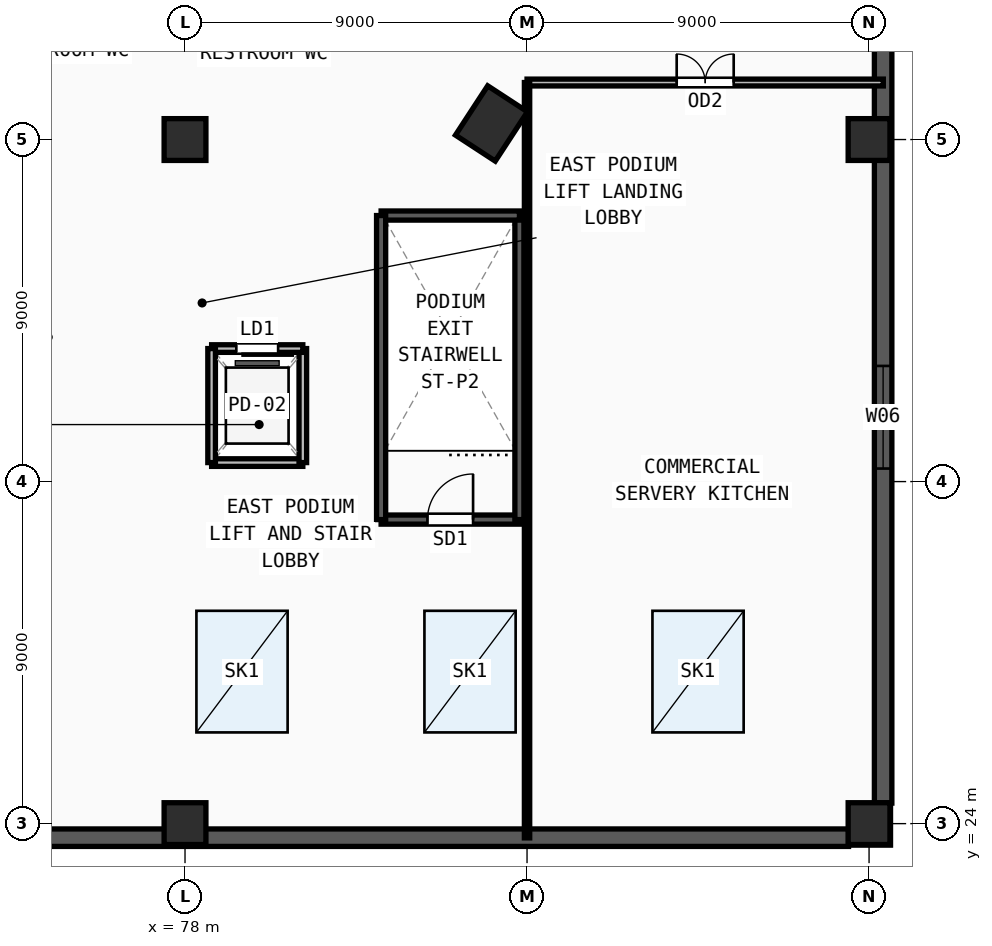
"""IFC4 building model, lengths in metres.
Left out: names, types, materials, properties, quantities, classifications, styles, units other than length and angle.
Written with IfcOpenShell. Run it as: python <this file> out.ifc"""

import sys

from ifc_helpers import new_model, si_unit, direction, frame, frame_2d, origin, origin_2d, place, context, subcontext, project, spatial, rectangle, extrude, source, transform, mapped, element, fill, save


model = new_model("IFC4")
c1 = context("Model", 3, precision=1e-05, world=origin(), true_north=direction((0.0, 1.0)))
c2 = subcontext(c1, "Body", "Model", "MODEL_VIEW")
j1 = project(units=[si_unit("LENGTHUNIT", "METRE"), si_unit("PLANEANGLEUNIT", "RADIAN")], contexts=[c1])
p1 = place(None, origin())
s1 = spatial("IfcSite", under=j1, at=p1, CompositionType="ELEMENT")
p2 = place(p1, origin())
s2 = spatial("IfcBuilding", under=s1, at=p2, CompositionType="ELEMENT")
p3 = place(p2, frame((0.0, 0.0, 23.4)))
s3 = spatial("IfcBuildingStorey", under=s2, at=p3, CompositionType="ELEMENT", Elevation=23.4)
m1 = source(origin(), c2, "Body", "SweptSolid", [
    extrude(rectangle(XDim=1.55, YDim=1.25, at=origin_2d()), origin(), (0.0, 0.0, 1.0), 5.1),
])
p4 = place(p3, frame((86.064, 42.423, 0.0), z_axis=(0.0, 0.0, 1.0), x_axis=(0.546978918409, 0.837146380758, 0.0)))
e1 = element("IfcColumn", 1, at=p4, inside=s3, PredefinedType="COLUMN", context=c2, shape_type="MappedRepresentation", body=[
    mapped(m1, transform((0.0, 0.0, 0.0), x_axis=(1.0, 0.0, 0.0), y_axis=(0.0, 1.0, 0.0), z_axis=(0.0, 0.0, 1.0), scale=1.0)),
])
m2 = source(origin(), c2, "Body", "SweptSolid", [
    extrude(rectangle(XDim=1.1, YDim=1.1, at=origin_2d()), origin(), (0.0, 0.0, 1.0), 5.1),
])
for number, where, z_axis, x_axis in (
    (2, (78.0, 24.0, 0.0), (0.0, 0.0, 1.0), (1.0, 0.0, 0.0)),
    (3, (96.0, 24.0, 0.0), (0.0, 0.0, 1.0), (1.0, 0.0, 0.0)),
    (4, (78.0, 42.0, 0.0), (0.0, 0.0, 1.0), (1.0, 0.0, 0.0)),
    (5, (96.0, 42.0, 0.0), (0.0, 0.0, 1.0), (1.0, 0.0, 0.0)),
):
    element("IfcColumn", number, at=place(p3, frame(where, z_axis=z_axis, x_axis=x_axis)), inside=s3, PredefinedType="COLUMN", context=c2, shape_type="MappedRepresentation", body=[
        mapped(m2, transform((0.0, 0.0, 0.0), x_axis=(1.0, 0.0, 0.0), y_axis=(0.0, 1.0, 0.0), z_axis=(0.0, 0.0, 1.0), scale=1.0)),
    ])
p5 = place(p3, frame((96.37, 24.54, 0.0), z_axis=(0.0, 0.0, 1.0), x_axis=(0.0, 1.0, 0.0)))
e6 = element("IfcWall", 6, at=p5, inside=s3, PredefinedType="SOLIDWALL", context=c2, shape_type="SweptSolid", body=[
    extrude(rectangle(XDim=60.92, YDim=0.46, at=frame_2d((30.46, 0.0))), origin(), (0.0, 0.0, 1.0), 4.82),
])
m3 = source(origin(), c2, "Body", "SweptSolid", [
    extrude(rectangle(XDim=2.7, YDim=2.35, at=frame_2d((1.35, 1.175))), frame((0.0, 0.24, 0.0), z_axis=(0.0, -1.0, 0.0), x_axis=(1.0, 0.0, 0.0)), (0.0, 0.0, 1.0), 0.48),
])
p6 = place(p5, frame((8.803, 0.0, 0.55)))
e7 = element("IfcOpeningElement", 7, at=p6, cuts=e6, PredefinedType="OPENING", context=c2, shape_type="MappedRepresentation", body=[
    mapped(m3, transform((0.0, 0.0, 0.0), x_axis=(1.0, 0.0, 0.0), y_axis=(0.0, 1.0, 0.0), z_axis=(0.0, 0.0, 1.0), scale=1.0)),
])
p7 = place(p5, frame((29.11, 0.0, 0.55)))
e8 = element("IfcOpeningElement", 8, at=p7, cuts=e6, PredefinedType="OPENING", context=c2, shape_type="MappedRepresentation", body=[
    mapped(m3, transform((0.0, 0.0, 0.0), x_axis=(1.0, 0.0, 0.0), y_axis=(0.0, 1.0, 0.0), z_axis=(0.0, 0.0, 1.0), scale=1.0)),
])
p8 = place(p5, frame((39.263, 0.0, 0.55)))
e9 = element("IfcOpeningElement", 9, at=p8, cuts=e6, PredefinedType="OPENING", context=c2, shape_type="MappedRepresentation", body=[
    mapped(m3, transform((0.0, 0.0, 0.0), x_axis=(1.0, 0.0, 0.0), y_axis=(0.0, 1.0, 0.0), z_axis=(0.0, 0.0, 1.0), scale=1.0)),
])
p9 = place(p5, frame((49.417, 0.0, 0.55)))
e10 = element("IfcOpeningElement", 10, at=p9, cuts=e6, PredefinedType="OPENING", context=c2, shape_type="MappedRepresentation", body=[
    mapped(m3, transform((0.0, 0.0, 0.0), x_axis=(1.0, 0.0, 0.0), y_axis=(0.0, 1.0, 0.0), z_axis=(0.0, 0.0, 1.0), scale=1.0)),
])
p10 = place(p3, frame((24.54, 23.63, 0.0), z_axis=(0.0, 0.0, 1.0), x_axis=(1.0, 0.0, 0.0)))
e11 = element("IfcWall", 11, at=p10, inside=s3, PredefinedType="SOLIDWALL", context=c2, shape_type="SweptSolid", body=[
    extrude(rectangle(XDim=70.92, YDim=0.46, at=frame_2d((35.46, 0.0))), origin(), (0.0, 0.0, 1.0), 4.82),
])
p11 = place(p10, frame((7.515, 0.0, 0.55)))
e12 = element("IfcOpeningElement", 12, at=p11, cuts=e11, PredefinedType="OPENING", context=c2, shape_type="MappedRepresentation", body=[
    mapped(m3, transform((0.0, 0.0, 0.0), x_axis=(1.0, 0.0, 0.0), y_axis=(0.0, 1.0, 0.0), z_axis=(0.0, 0.0, 1.0), scale=1.0)),
])
p12 = place(p10, frame((25.245, 0.0, 0.55)))
e13 = element("IfcOpeningElement", 13, at=p12, cuts=e11, PredefinedType="OPENING", context=c2, shape_type="MappedRepresentation", body=[
    mapped(m3, transform((0.0, 0.0, 0.0), x_axis=(1.0, 0.0, 0.0), y_axis=(0.0, 1.0, 0.0), z_axis=(0.0, 0.0, 1.0), scale=1.0)),
])
p13 = place(p10, frame((42.975, 0.0, 0.55)))
e14 = element("IfcOpeningElement", 14, at=p13, cuts=e11, PredefinedType="OPENING", context=c2, shape_type="MappedRepresentation", body=[
    mapped(m3, transform((0.0, 0.0, 0.0), x_axis=(1.0, 0.0, 0.0), y_axis=(0.0, 1.0, 0.0), z_axis=(0.0, 0.0, 1.0), scale=1.0)),
])
p14 = place(p3, frame((83.16, 32.0, 0.0), z_axis=(0.0, 0.0, 1.0), x_axis=(1.0, 0.0, 0.0)))
e15 = element("IfcWall", 15, at=p14, inside=s3, PredefinedType="SOLIDWALL", context=c2, shape_type="SweptSolid", body=[
    extrude(rectangle(XDim=3.64, YDim=0.24, at=frame_2d((1.82, 0.0))), origin(), (0.0, 0.0, 1.0), 4.82),
])
m4 = source(origin(), c2, "Body", "SweptSolid", [
    extrude(rectangle(XDim=1.2, YDim=2.2, at=frame_2d((0.6, 1.1))), frame((0.0, 0.13, 0.0), z_axis=(0.0, -1.0, 0.0), x_axis=(1.0, 0.0, 0.0)), (0.0, 0.0, 1.0), 0.26),
])
p15 = place(p14, frame((1.22, 0.0, 0.0)))
e16 = element("IfcOpeningElement", 16, at=p15, cuts=e15, PredefinedType="OPENING", context=c2, shape_type="MappedRepresentation", body=[
    mapped(m4, transform((0.0, 0.0, 0.0), x_axis=(1.0, 0.0, 0.0), y_axis=(0.0, 1.0, 0.0), z_axis=(0.0, 0.0, 1.0), scale=1.0)),
])
p16 = place(p3, frame((86.8, 32.0, 0.0), z_axis=(0.0, 0.0, 1.0), x_axis=(0.0, 1.0, 0.0)))
e17 = element("IfcWall", 17, at=p16, inside=s3, PredefinedType="SOLIDWALL", context=c2, shape_type="SweptSolid", body=[
    extrude(rectangle(XDim=8.0, YDim=0.24, at=frame_2d((4.0, 0.0))), origin(), (0.0, 0.0, 1.0), 4.82),
])
p17 = place(p3, frame((86.8, 40.0, 0.0), z_axis=(0.0, 0.0, 1.0), x_axis=(-1.0, 0.0, 0.0)))
e18 = element("IfcWall", 18, at=p17, inside=s3, PredefinedType="SOLIDWALL", context=c2, shape_type="SweptSolid", body=[
    extrude(rectangle(XDim=3.64, YDim=0.24, at=frame_2d((1.82, 0.0))), origin(), (0.0, 0.0, 1.0), 4.82),
])
p18 = place(p3, frame((83.16, 40.0, 0.0), z_axis=(0.0, 0.0, 1.0), x_axis=(0.0, -1.0, 0.0)))
e19 = element("IfcWall", 19, at=p18, inside=s3, PredefinedType="SOLIDWALL", context=c2, shape_type="SweptSolid", body=[
    extrude(rectangle(XDim=8.0, YDim=0.24, at=frame_2d((4.0, 0.0))), origin(), (0.0, 0.0, 1.0), 4.82),
])
p19 = place(p3, frame((78.7, 33.5, 0.0), z_axis=(0.0, 0.0, 1.0), x_axis=(1.0, 0.0, 0.0)))
e20 = element("IfcWall", 20, at=p19, inside=s3, PredefinedType="SOLIDWALL", context=c2, shape_type="SweptSolid", body=[
    extrude(rectangle(XDim=2.4, YDim=0.2, at=frame_2d((1.2, 0.0))), origin(), (0.0, 0.0, 1.0), 4.82),
])
p20 = place(p3, frame((81.1, 33.5, 0.0), z_axis=(0.0, 0.0, 1.0), x_axis=(0.0, 1.0, 0.0)))
e21 = element("IfcWall", 21, at=p20, inside=s3, PredefinedType="SOLIDWALL", context=c2, shape_type="SweptSolid", body=[
    extrude(rectangle(XDim=3.0, YDim=0.2, at=frame_2d((1.5, 0.0))), origin(), (0.0, 0.0, 1.0), 4.82),
])
p21 = place(p3, frame((81.1, 36.5, 0.0), z_axis=(0.0, 0.0, 1.0), x_axis=(-1.0, 0.0, 0.0)))
e22 = element("IfcWall", 22, at=p21, inside=s3, PredefinedType="SOLIDWALL", context=c2, shape_type="SweptSolid", body=[
    extrude(rectangle(XDim=2.4, YDim=0.2, at=frame_2d((1.2, 0.0))), origin(), (0.0, 0.0, 1.0), 4.82),
])
m5 = source(origin(), c2, "Body", "SweptSolid", [
    extrude(rectangle(XDim=1.1, YDim=2.2, at=frame_2d((0.55, 1.1))), frame((0.0, 0.11, 0.0), z_axis=(0.0, -1.0, 0.0), x_axis=(1.0, 0.0, 0.0)), (0.0, 0.0, 1.0), 0.22),
])
p22 = place(p21, frame((0.65, 0.0, 0.0)))
e23 = element("IfcOpeningElement", 23, at=p22, cuts=e22, PredefinedType="OPENING", context=c2, shape_type="MappedRepresentation", body=[
    mapped(m5, transform((0.0, 0.0, 0.0), x_axis=(1.0, 0.0, 0.0), y_axis=(0.0, 1.0, 0.0), z_axis=(0.0, 0.0, 1.0), scale=1.0)),
])
p23 = place(p3, frame((78.7, 36.5, 0.0), z_axis=(0.0, 0.0, 1.0), x_axis=(0.0, -1.0, 0.0)))
e24 = element("IfcWall", 24, at=p23, inside=s3, PredefinedType="SOLIDWALL", context=c2, shape_type="SweptSolid", body=[
    extrude(rectangle(XDim=3.0, YDim=0.2, at=frame_2d((1.5, 0.0))), origin(), (0.0, 0.0, 1.0), 4.82),
])
p24 = place(p3, frame((87.0, 43.5, 0.0), z_axis=(0.0, 0.0, 1.0), x_axis=(1.0, 0.0, 0.0)))
e25 = element("IfcWall", 25, at=p24, inside=s3, PredefinedType="PARTITIONING", context=c2, shape_type="SweptSolid", body=[
    extrude(rectangle(XDim=9.375, YDim=0.18, at=frame_2d((4.688, 0.0))), origin(), (0.0, 0.0, 1.0), 4.82),
])
m6 = source(origin(), c2, "Body", "SweptSolid", [
    extrude(rectangle(XDim=1.5, YDim=2.2, at=frame_2d((0.75, 1.1))), frame((0.0, 0.1, 0.0), z_axis=(0.0, -1.0, 0.0), x_axis=(1.0, 0.0, 0.0)), (0.0, 0.0, 1.0), 0.2),
])
p25 = place(p24, frame((3.938, 0.0, 0.0)))
e26 = element("IfcOpeningElement", 26, at=p25, cuts=e25, PredefinedType="OPENING", context=c2, shape_type="MappedRepresentation", body=[
    mapped(m6, transform((0.0, 0.0, 0.0), x_axis=(1.0, 0.0, 0.0), y_axis=(0.0, 1.0, 0.0), z_axis=(0.0, 0.0, 1.0), scale=1.0)),
])
p26 = place(p3, frame((87.0, 23.625, 0.0), z_axis=(0.0, 0.0, 1.0), x_axis=(0.0, 1.0, 0.0)))
e27 = element("IfcWall", 27, at=p26, inside=s3, PredefinedType="PARTITIONING", context=c2, shape_type="SweptSolid", body=[
    extrude(rectangle(XDim=19.875, YDim=0.14, at=frame_2d((9.938, 0.0))), origin(), (0.0, 0.0, 1.0), 4.82),
])
m7 = source(origin(), c2, "Body", "SweptSolid", [
    extrude(rectangle(XDim=2.7, YDim=2.35, at=frame_2d((1.35, 1.175))), frame((0.0, 0.03, 0.0), z_axis=(0.0, -1.0, 0.0), x_axis=(1.0, 0.0, 0.0)), (0.0, 0.0, 1.0), 0.06),
])
p27 = place(p6, origin())
e28 = element("IfcWindow", 28, at=p27, inside=s3, PartitioningType="TRIPLE_PANEL_VERTICAL", PredefinedType="WINDOW", context=c2, shape_type="MappedRepresentation", body=[
    mapped(m7, transform((0.0, 0.0, 0.0), x_axis=(1.0, 0.0, 0.0), y_axis=(0.0, 1.0, 0.0), z_axis=(0.0, 0.0, 1.0), scale=1.0)),
])
fill(e7, e28)
p28 = place(p3, frame((0.0, 0.0, -0.9)))
p29 = place(p28, frame((79.5, 28.0, 0.0)))
p30 = place(p29, frame((0.0, 0.0, 0.85)))
e29 = element("IfcWindow", 29, at=p30, inside=s3, PartitioningType="SINGLE_PANEL", PredefinedType="SKYLIGHT", context=c2, shape_type="SweptSolid", body=[
    extrude(rectangle(XDim=2.4, YDim=3.2, at=origin_2d()), origin(), (0.0, 0.0, 1.0), 0.05),
])
p31 = place(p28, frame((85.5, 28.0, 0.0)))
p32 = place(p31, frame((0.0, 0.0, 0.85)))
e30 = element("IfcWindow", 30, at=p32, inside=s3, PartitioningType="SINGLE_PANEL", PredefinedType="SKYLIGHT", context=c2, shape_type="SweptSolid", body=[
    extrude(rectangle(XDim=2.4, YDim=3.2, at=origin_2d()), origin(), (0.0, 0.0, 1.0), 0.05),
])
p33 = place(p28, frame((91.5, 28.0, 0.0)))
p34 = place(p33, frame((0.0, 0.0, 0.85)))
e31 = element("IfcWindow", 31, at=p34, inside=s3, PartitioningType="SINGLE_PANEL", PredefinedType="SKYLIGHT", context=c2, shape_type="SweptSolid", body=[
    extrude(rectangle(XDim=2.4, YDim=3.2, at=origin_2d()), origin(), (0.0, 0.0, 1.0), 0.05),
])
m8 = source(origin(), c2, "Body", "SweptSolid", [
    extrude(rectangle(XDim=1.2, YDim=2.2, at=frame_2d((0.6, 1.1))), frame((0.0, 0.025, 0.0), z_axis=(0.0, -1.0, 0.0), x_axis=(1.0, 0.0, 0.0)), (0.0, 0.0, 1.0), 0.05),
])
p35 = place(p15, origin())
e32 = element("IfcDoor", 32, at=p35, inside=s3, OperationType="SINGLE_SWING_RIGHT", PredefinedType="DOOR", context=c2, shape_type="MappedRepresentation", body=[
    mapped(m8, transform((0.0, 0.0, 0.0), x_axis=(1.0, 0.0, 0.0), y_axis=(0.0, 1.0, 0.0), z_axis=(0.0, 0.0, 1.0), scale=1.0)),
])
fill(e16, e32)
m9 = source(origin(), c2, "Body", "SweptSolid", [
    extrude(rectangle(XDim=1.1, YDim=2.2, at=frame_2d((0.55, 1.1))), frame((0.0, 0.025, 0.0), z_axis=(0.0, -1.0, 0.0), x_axis=(1.0, 0.0, 0.0)), (0.0, 0.0, 1.0), 0.05),
])
p36 = place(p22, origin())
e33 = element("IfcDoor", 33, at=p36, inside=s3, OperationType="SLIDING_TO_LEFT", PredefinedType="DOOR", context=c2, shape_type="MappedRepresentation", body=[
    mapped(m9, transform((0.0, 0.0, 0.0), x_axis=(1.0, 0.0, 0.0), y_axis=(0.0, 1.0, 0.0), z_axis=(0.0, 0.0, 1.0), scale=1.0)),
])
fill(e23, e33)
m10 = source(origin(), c2, "Body", "SweptSolid", [
    extrude(rectangle(XDim=1.5, YDim=2.2, at=frame_2d((0.75, 1.1))), frame((0.0, 0.025, 0.0), z_axis=(0.0, -1.0, 0.0), x_axis=(1.0, 0.0, 0.0)), (0.0, 0.0, 1.0), 0.05),
])
p37 = place(p25, origin())
e34 = element("IfcDoor", 34, at=p37, inside=s3, OperationType="DOUBLE_DOOR_SINGLE_SWING", PredefinedType="DOOR", context=c2, shape_type="MappedRepresentation", body=[
    mapped(m10, transform((0.0, 0.0, 0.0), x_axis=(1.0, 0.0, 0.0), y_axis=(0.0, 1.0, 0.0), z_axis=(0.0, 0.0, 1.0), scale=1.0)),
])
fill(e26, e34)
save(model, sys.argv[1])
